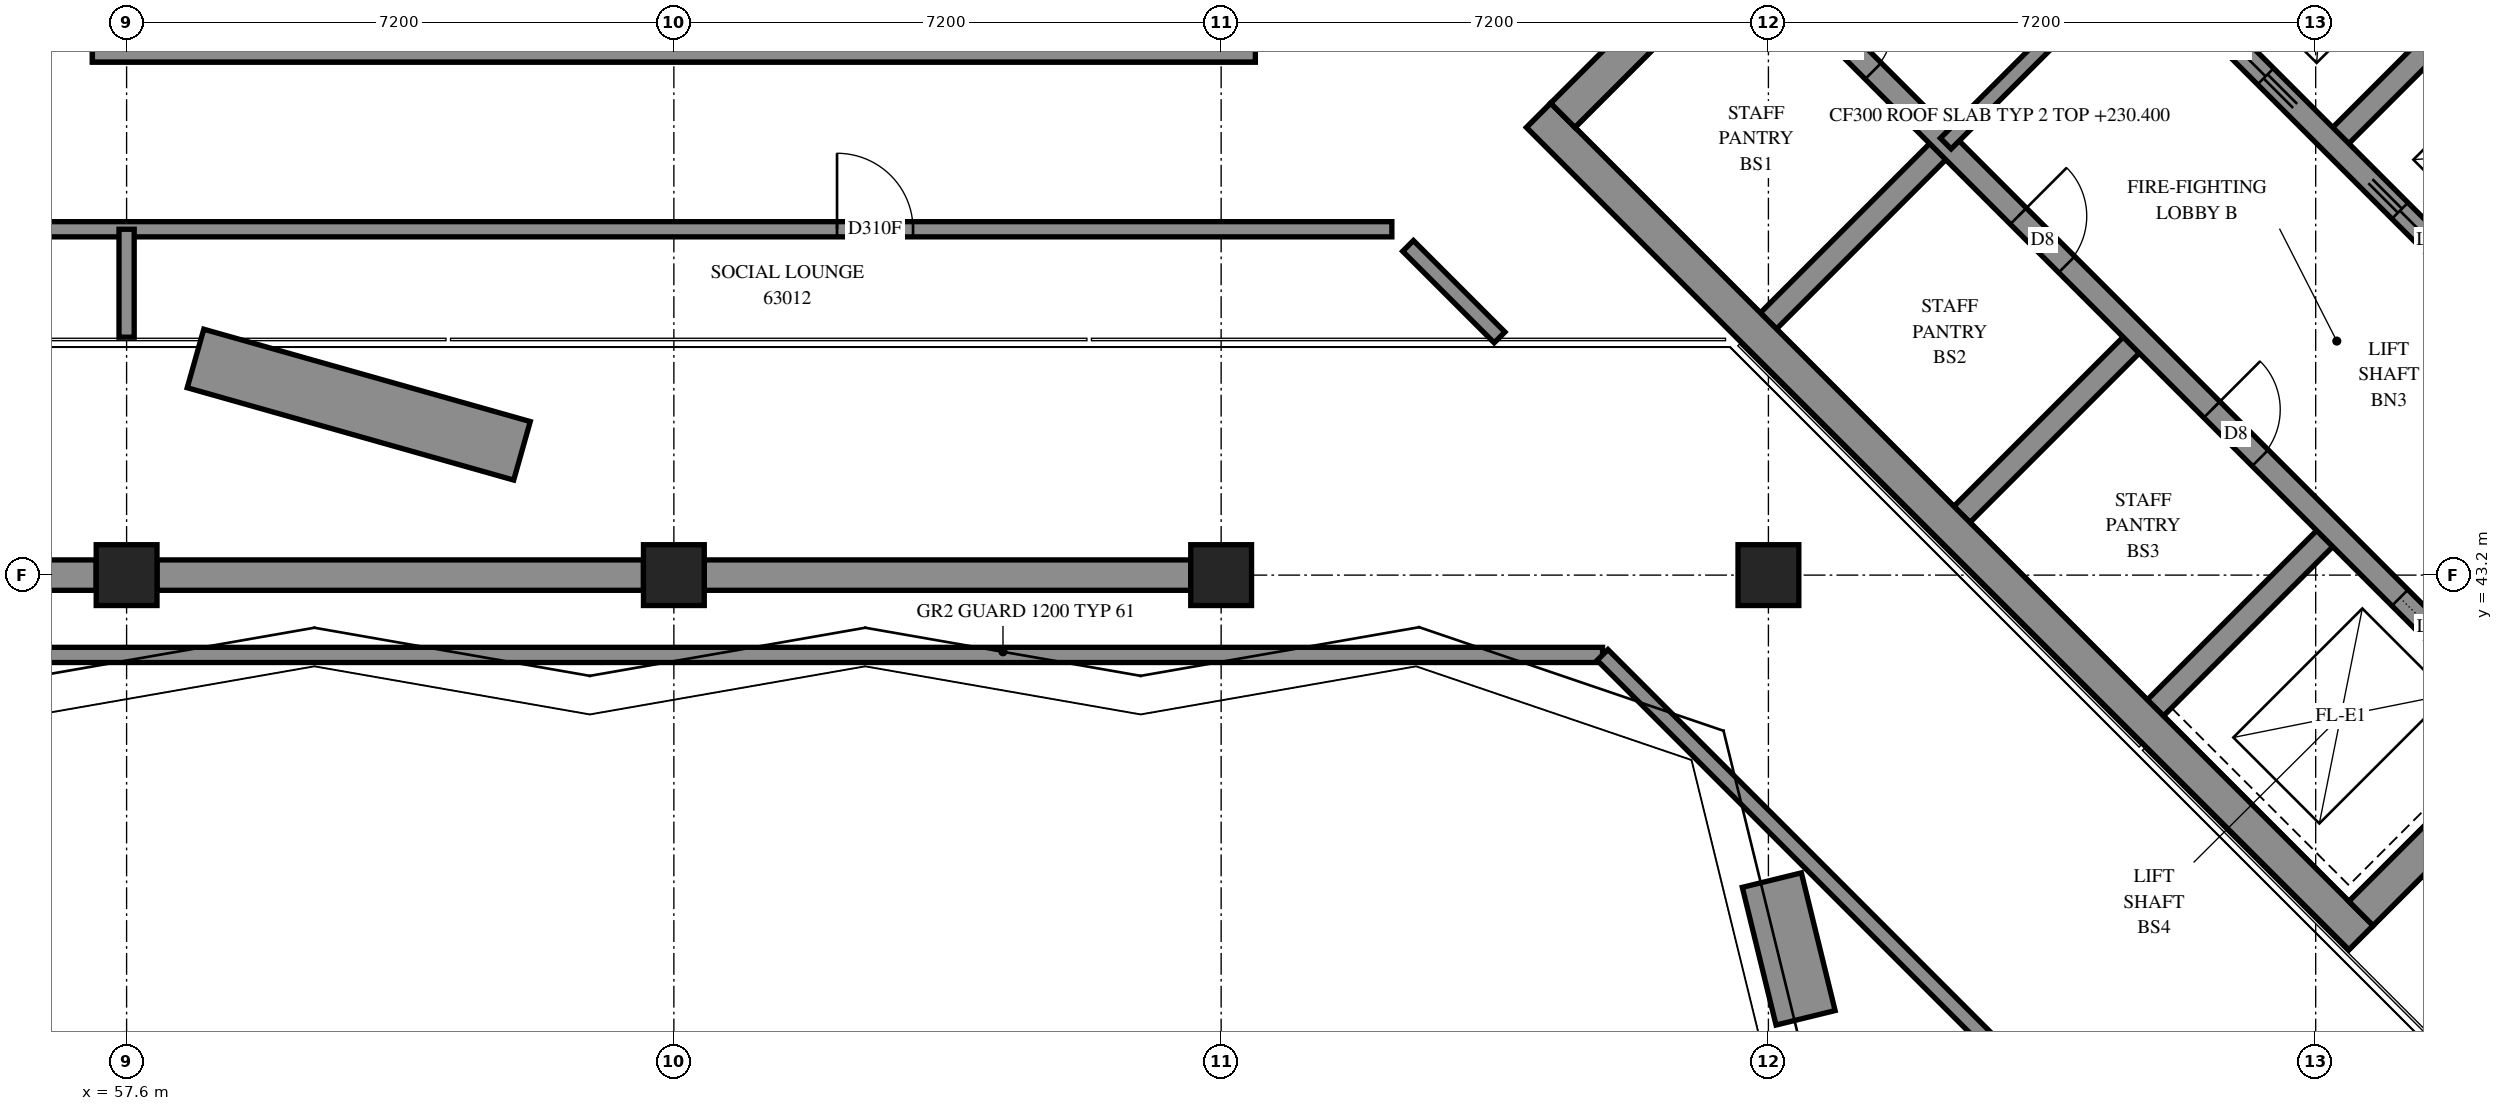
"""IFC4 building model, lengths in metres.
Left out: names, types, materials, properties, quantities, classifications, styles, units other than length and angle.
Written with IfcOpenShell. Run it as: python <this file> out.ifc"""

import sys

from ifc_helpers import new_model, si_unit, direction, frame, frame_2d, origin, origin_2d, place, context, subcontext, project, spatial, polyline, rectangle, outline, extrude, element, fill, save


model = new_model("IFC4")
c1 = context("Model", 3, precision=1e-05, world=origin(), true_north=direction((0.0, 1.0)))
c2 = subcontext(c1, "Body", "Model", "MODEL_VIEW")
j1 = project(units=[si_unit("LENGTHUNIT", "METRE"), si_unit("PLANEANGLEUNIT", "RADIAN")], contexts=[c1])
p1 = place(None, origin())
s1 = spatial("IfcSite", under=j1, at=p1, CompositionType="ELEMENT")
p2 = place(p1, origin())
s2 = spatial("IfcBuilding", under=s1, at=p2, CompositionType="ELEMENT")
p3 = place(p2, frame((0.0, 0.0, 230.4)))
s3 = spatial("IfcBuildingStorey", under=s2, at=p3, CompositionType="ELEMENT", Elevation=230.4)
for number, where, z_axis, x_axis in (
    (1, (57.6, 43.2, 0.0), (0.0, 0.0, 1.0), (1.0, 0.0, 0.0)),
    (2, (64.8, 43.2, 0.0), (0.0, 0.0, 1.0), (1.0, 0.0, 0.0)),
    (3, (72.0, 43.2, 0.0), (0.0, 0.0, 1.0), (1.0, 0.0, 0.0)),
    (4, (79.2, 43.2, 0.0), (0.0, 0.0, 1.0), (1.0, 0.0, 0.0)),
):
    element("IfcColumn", number, at=place(p3, frame(where, z_axis=z_axis, x_axis=x_axis)), inside=s3, PredefinedType="COLUMN", context=c2, shape_type="SweptSolid", body=[
        extrude(rectangle(XDim=0.8, YDim=0.8, at=origin_2d()), origin(), (0.0, 0.0, 1.0), 3.9),
    ])
for number, where, z_axis, x_axis in (
    (5, (57.15, 50.175, -0.3), (0.0, 0.0, 1.0), (1.0, 0.0, 0.0)),
    (6, (76.177, 49.249, -0.3), (0.0, 0.0, 1.0), (0.707, -0.707, 0.0)),
):
    element("IfcWall", number, at=place(p3, frame(where, z_axis=z_axis, x_axis=x_axis)), inside=s3, PredefinedType="SHEAR", context=c2, shape_type="SweptSolid", body=[
        extrude(rectangle(XDim=15.3, YDim=0.45, at=frame_2d((7.65, 0.0))), origin(), (0.0, 0.0, 1.0), 3.5),
    ])
p4 = place(p3, frame((86.678, 59.749, -0.3), z_axis=(0.0, 0.0, 1.0), x_axis=(0.7071035132, -0.7071100491, 0.0)))
e7 = element("IfcWall", 7, at=p4, inside=s3, PredefinedType="SHEAR", context=c2, shape_type="SweptSolid", body=[
    extrude(rectangle(XDim=15.3, YDim=0.45, at=frame_2d((7.65, 0.0))), origin(), (0.0, 0.0, 1.0), 3.5),
])
p5 = place(p4, frame((10.45, 0.0, 0.3)))
e8 = element("IfcOpeningElement", 8, at=p5, cuts=e7, PredefinedType="OPENING", context=c2, shape_type="SweptSolid", body=[
    extrude(rectangle(XDim=0.8, YDim=2.1, at=frame_2d((0.4, 1.05))), frame((0.0, 0.235, 0.0), z_axis=(0.0, -1.0, 0.0), x_axis=(1.0, 0.0, 0.0)), (0.0, 0.0, 1.0), 0.47),
])
p6 = place(p3, frame((76.495, 49.249, -0.3), z_axis=(0.0, 0.0, 1.0), x_axis=(0.7071067812, 0.7071067812, 0.0)))
e9 = element("IfcWall", 9, at=p6, inside=s3, PredefinedType="SHEAR", context=c2, shape_type="SweptSolid", body=[
    extrude(rectangle(XDim=14.4, YDim=0.45, at=frame_2d((7.2, 0.0))), origin(), (0.0, 0.0, 1.0), 3.5),
])
p7 = place(p6, frame((4.55, 0.0, 0.3)))
e10 = element("IfcOpeningElement", 10, at=p7, cuts=e9, PredefinedType="OPENING", context=c2, shape_type="SweptSolid", body=[
    extrude(rectangle(XDim=1.1, YDim=2.1, at=frame_2d((0.55, 1.05))), frame((0.0, 0.235, 0.0), z_axis=(0.0, -1.0, 0.0), x_axis=(1.0, 0.0, 0.0)), (0.0, 0.0, 1.0), 0.47),
])
p8 = place(p6, frame((11.35, 0.0, 0.3)))
e11 = element("IfcOpeningElement", 11, at=p8, cuts=e9, PredefinedType="OPENING", context=c2, shape_type="SweptSolid", body=[
    extrude(rectangle(XDim=1.1, YDim=2.1, at=frame_2d((0.55, 1.05))), frame((0.0, 0.235, 0.0), z_axis=(0.0, -1.0, 0.0), x_axis=(1.0, 0.0, 0.0)), (0.0, 0.0, 1.0), 0.47),
])
p9 = place(p3, frame((86.996, 38.748, -0.3), z_axis=(0.0, 0.0, 1.0), x_axis=(0.7071067812, 0.7071067812, 0.0)))
e12 = element("IfcWall", 12, at=p9, inside=s3, PredefinedType="SHEAR", context=c2, shape_type="SweptSolid", body=[
    extrude(rectangle(XDim=14.4, YDim=0.45, at=frame_2d((7.2, 0.0))), origin(), (0.0, 0.0, 1.0), 3.5),
])
p10 = place(p9, frame((4.55, 0.0, 0.3)))
e13 = element("IfcOpeningElement", 13, at=p10, cuts=e12, PredefinedType="OPENING", context=c2, shape_type="SweptSolid", body=[
    extrude(rectangle(XDim=1.1, YDim=2.1, at=frame_2d((0.55, 1.05))), frame((0.0, 0.235, 0.0), z_axis=(0.0, -1.0, 0.0), x_axis=(1.0, 0.0, 0.0)), (0.0, 0.0, 1.0), 0.47),
])
p11 = place(p9, frame((11.35, 0.0, 0.3)))
e14 = element("IfcOpeningElement", 14, at=p11, cuts=e12, PredefinedType="OPENING", context=c2, shape_type="SweptSolid", body=[
    extrude(rectangle(XDim=1.1, YDim=2.1, at=frame_2d((0.55, 1.05))), frame((0.0, 0.235, 0.0), z_axis=(0.0, -1.0, 0.0), x_axis=(1.0, 0.0, 0.0)), (0.0, 0.0, 1.0), 0.47),
])
p12 = place(p3, frame((79.2, 46.544, 0.0), z_axis=(0.0, 0.0, 1.0), x_axis=(0.7071219326, 0.7070916295, 0.0)))
e15 = element("IfcWall", 15, at=p12, inside=s3, PredefinedType="SOLIDWALL", context=c2, shape_type="SweptSolid", body=[
    extrude(rectangle(XDim=3.3, YDim=0.3, at=frame_2d((1.65, 0.0))), origin(), (0.0, 0.0, 1.0), 3.9),
])
p13 = place(p3, frame((81.746, 43.999, 0.0), z_axis=(0.0, 0.0, 1.0), x_axis=(0.7071067812, 0.7071067812, 0.0)))
e16 = element("IfcWall", 16, at=p13, inside=s3, PredefinedType="SOLIDWALL", context=c2, shape_type="SweptSolid", body=[
    extrude(rectangle(XDim=3.3, YDim=0.3, at=frame_2d((1.65, 0.0))), origin(), (0.0, 0.0, 1.0), 3.9),
])
p14 = place(p3, frame((86.625, 48.878, 0.0), z_axis=(0.0, 0.0, 1.0), x_axis=(0.7071067812, 0.7071067812, 0.0)))
e17 = element("IfcWall", 17, at=p14, inside=s3, PredefinedType="SOLIDWALL", context=c2, shape_type="SweptSolid", body=[
    extrude(rectangle(XDim=3.3, YDim=0.3, at=frame_2d((1.65, 0.0))), origin(), (0.0, 0.0, 1.0), 3.9),
])
p15 = place(p3, frame((84.291, 41.453, 0.0), z_axis=(0.0, 0.0, 1.0), x_axis=(0.7071067812, 0.7071067812, 0.0)))
e18 = element("IfcWall", 18, at=p15, inside=s3, PredefinedType="SOLIDWALL", context=c2, shape_type="SweptSolid", body=[
    extrude(rectangle(XDim=3.3, YDim=0.3, at=frame_2d((1.65, 0.0))), origin(), (0.0, 0.0, 1.0), 3.9),
])
p16 = place(p3, frame((78.988, 51.423, 0.0), z_axis=(0.0, 0.0, 1.0), x_axis=(0.7071067812, -0.7071067812, 0.0)))
e19 = element("IfcWall", 19, at=p16, inside=s3, PredefinedType="SOLIDWALL", context=c2, shape_type="SweptSolid", body=[
    extrude(rectangle(XDim=14.4, YDim=0.3, at=frame_2d((7.2, 0.0))), origin(), (0.0, 0.0, 1.0), 3.9),
])
p17 = place(p16, frame((1.35, 0.0, 0.0)))
e20 = element("IfcOpeningElement", 20, at=p17, cuts=e19, PredefinedType="OPENING", context=c2, shape_type="SweptSolid", body=[
    extrude(rectangle(XDim=0.9, YDim=2.1, at=frame_2d((0.45, 1.05))), frame((0.0, 0.16, 0.0), z_axis=(0.0, -1.0, 0.0), x_axis=(1.0, 0.0, 0.0)), (0.0, 0.0, 1.0), 0.32),
])
p18 = place(p16, frame((4.95, 0.0, 0.0)))
e21 = element("IfcOpeningElement", 21, at=p18, cuts=e19, PredefinedType="OPENING", context=c2, shape_type="SweptSolid", body=[
    extrude(rectangle(XDim=0.9, YDim=2.1, at=frame_2d((0.45, 1.05))), frame((0.0, 0.16, 0.0), z_axis=(0.0, -1.0, 0.0), x_axis=(1.0, 0.0, 0.0)), (0.0, 0.0, 1.0), 0.32),
])
p19 = place(p16, frame((8.55, 0.0, 0.0)))
e22 = element("IfcOpeningElement", 22, at=p19, cuts=e19, PredefinedType="OPENING", context=c2, shape_type="SweptSolid", body=[
    extrude(rectangle(XDim=0.9, YDim=2.1, at=frame_2d((0.45, 1.05))), frame((0.0, 0.16, 0.0), z_axis=(0.0, -1.0, 0.0), x_axis=(1.0, 0.0, 0.0)), (0.0, 0.0, 1.0), 0.32),
])
p20 = place(p16, frame((12.05, 0.0, 0.0)))
e23 = element("IfcOpeningElement", 23, at=p20, cuts=e19, PredefinedType="OPENING", context=c2, shape_type="SweptSolid", body=[
    extrude(rectangle(XDim=1.1, YDim=2.1, at=frame_2d((0.55, 1.05))), frame((0.0, 0.16, 0.0), z_axis=(0.0, -1.0, 0.0), x_axis=(1.0, 0.0, 0.0)), (0.0, 0.0, 1.0), 0.32),
])
p21 = place(p3, frame((81.534, 53.969, 0.0), z_axis=(0.0, 0.0, 1.0), x_axis=(0.707103309, -0.7071102534, 0.0)))
e24 = element("IfcWall", 24, at=p21, inside=s3, PredefinedType="SOLIDWALL", context=c2, shape_type="SweptSolid", body=[
    extrude(rectangle(XDim=14.4, YDim=0.3, at=frame_2d((7.2, 0.0))), origin(), (0.0, 0.0, 1.0), 3.9),
])
p22 = place(p21, frame((1.25, 0.0, 0.0)))
e25 = element("IfcOpeningElement", 25, at=p22, cuts=e24, PredefinedType="OPENING", context=c2, shape_type="SweptSolid", body=[
    extrude(rectangle(XDim=1.1, YDim=2.1, at=frame_2d((0.55, 1.05))), frame((0.0, 0.16, 0.0), z_axis=(0.0, -1.0, 0.0), x_axis=(1.0, 0.0, 0.0)), (0.0, 0.0, 1.0), 0.32),
])
p23 = place(p21, frame((4.85, 0.0, 0.0)))
e26 = element("IfcOpeningElement", 26, at=p23, cuts=e24, PredefinedType="OPENING", context=c2, shape_type="SweptSolid", body=[
    extrude(rectangle(XDim=1.1, YDim=2.1, at=frame_2d((0.55, 1.05))), frame((0.0, 0.16, 0.0), z_axis=(0.0, -1.0, 0.0), x_axis=(1.0, 0.0, 0.0)), (0.0, 0.0, 1.0), 0.32),
])
p24 = place(p21, frame((8.45, 0.0, 0.0)))
e27 = element("IfcOpeningElement", 27, at=p24, cuts=e24, PredefinedType="OPENING", context=c2, shape_type="SweptSolid", body=[
    extrude(rectangle(XDim=1.1, YDim=2.1, at=frame_2d((0.55, 1.05))), frame((0.0, 0.16, 0.0), z_axis=(0.0, -1.0, 0.0), x_axis=(1.0, 0.0, 0.0)), (0.0, 0.0, 1.0), 0.32),
])
p25 = place(p21, frame((12.05, 0.0, 0.0)))
e28 = element("IfcOpeningElement", 28, at=p25, cuts=e24, PredefinedType="OPENING", context=c2, shape_type="SweptSolid", body=[
    extrude(rectangle(XDim=1.1, YDim=2.1, at=frame_2d((0.55, 1.05))), frame((0.0, 0.16, 0.0), z_axis=(0.0, -1.0, 0.0), x_axis=(1.0, 0.0, 0.0)), (0.0, 0.0, 1.0), 0.32),
])
p26 = place(p3, frame((79.245, 39.188, 0.0), z_axis=(0.0, 0.0, 1.0), x_axis=(0.2379162082, -0.9712856829, 0.0)))
e29 = element("IfcWall", 29, at=p26, inside=s3, PredefinedType="SOLIDWALL", context=c2, shape_type="SweptSolid", body=[
    extrude(rectangle(XDim=1.865, YDim=0.8, at=frame_2d((0.933, 0.0))), origin(), (0.0, 0.0, 1.0), 0.65),
])
p27 = place(p3, frame((62.802, 44.835, 0.0), z_axis=(0.0, 0.0, 1.0), x_axis=(-0.962266055, 0.2721103442, 0.0)))
e30 = element("IfcWall", 30, at=p27, inside=s3, PredefinedType="SOLIDWALL", context=c2, shape_type="SweptSolid", body=[
    extrude(rectangle(XDim=4.464, YDim=0.8, at=frame_2d((2.232, 0.0))), origin(), (0.0, 0.0, 1.0), 0.65),
])
p28 = place(p3, frame((102.747, 49.938, 0.0), z_axis=(0.0, 0.0, 1.0), x_axis=(-0.7071083109, 0.7071052514, 0.0)))
e31 = element("IfcWall", 31, at=p28, inside=s3, PredefinedType="SOLIDWALL", context=c2, shape_type="SweptSolid", body=[
    extrude(outline(polyline([(-0.1, -0.1), (32.726, -0.1), (32.644, 0.1), (0.1, 0.1), (-0.1, -0.1)])), origin(), (0.0, 0.0, 1.0), 4.2),
])
p29 = place(p3, frame((49.35, 42.15, 0.0), z_axis=(0.0, 0.0, 1.0), x_axis=(1.0, 0.0, 0.0)))
e32 = element("IfcWall", 32, at=p29, inside=s3, PredefinedType="SOLIDWALL", context=c2, shape_type="SweptSolid", body=[
    extrude(outline(polyline([(-0.1, -0.1), (27.627, -0.1), (27.709, 0.1), (0.1, 0.1), (-0.1, -0.1)])), origin(), (0.0, 0.0, 1.0), 4.2),
])
p30 = place(p3, frame((77.018, 42.15, 0.0), z_axis=(0.0, 0.0, 1.0), x_axis=(0.7071039217, -0.7071096407, 0.0)))
e33 = element("IfcWall", 33, at=p30, inside=s3, PredefinedType="SOLIDWALL", context=c2, shape_type="SweptSolid", body=[
    extrude(outline(polyline([(0.041, -0.1), (17.586, -0.1), (17.386, 0.1), (-0.041, 0.1), (0.041, -0.1)])), origin(), (0.0, 0.0, 1.0), 4.2),
])
p31 = place(p3, frame((81.534, 48.878, 0.0), z_axis=(0.0, 0.0, 1.0), x_axis=(0.707092892, 0.7071206701, 0.0)))
e34 = element("IfcWall", 34, at=p31, inside=s3, PredefinedType="PARTITIONING", context=c2, shape_type="SweptSolid", body=[
    extrude(rectangle(XDim=3.6, YDim=0.2, at=frame_2d((1.8, 0.0))), origin(), (0.0, 0.0, 1.0), 3.9),
])
p32 = place(p3, frame((54.95, 47.75, 0.0), z_axis=(0.0, 0.0, 1.0), x_axis=(1.0, 0.0, 0.0)))
e35 = element("IfcWall", 35, at=p32, inside=s3, PredefinedType="PARTITIONING", context=c2, shape_type="SweptSolid", body=[
    extrude(rectangle(XDim=19.296, YDim=0.2, at=frame_2d((9.648, 0.0))), origin(), (0.0, 0.0, 1.0), 3.9),
])
p33 = place(p32, frame((11.997, 0.0, 0.0)))
e36 = element("IfcOpeningElement", 36, at=p33, cuts=e35, PredefinedType="OPENING", context=c2, shape_type="SweptSolid", body=[
    extrude(rectangle(XDim=1.0, YDim=2.1, at=frame_2d((0.5, 1.05))), frame((0.0, 0.11, 0.0), z_axis=(0.0, -1.0, 0.0), x_axis=(1.0, 0.0, 0.0)), (0.0, 0.0, 1.0), 0.22),
])
p34 = place(p3, frame((74.459, 47.531, 0.0), z_axis=(0.0, 0.0, 1.0), x_axis=(0.7071067812, -0.7071067812, 0.0)))
e37 = element("IfcWall", 37, at=p34, inside=s3, PredefinedType="PARTITIONING", context=c2, shape_type="SweptSolid", body=[
    extrude(rectangle(XDim=1.703, YDim=0.2, at=frame_2d((0.851, 0.0))), origin(), (0.0, 0.0, 1.0), 3.9),
])
p35 = place(p3, frame((57.6, 46.33, 0.0), z_axis=(0.0, 0.0, 1.0), x_axis=(0.0, 1.0, 0.0)))
e38 = element("IfcWall", 38, at=p35, inside=s3, PredefinedType="PARTITIONING", context=c2, shape_type="SweptSolid", body=[
    extrude(rectangle(XDim=1.42, YDim=0.2, at=frame_2d((0.71, 0.0))), origin(), (0.0, 0.0, 1.0), 3.9),
])
p36 = place(p17, origin())
e39 = element("IfcDoor", 39, at=p36, inside=s3, OperationType="SINGLE_SWING_LEFT", PredefinedType="DOOR", context=c2, shape_type="SweptSolid", body=[
    extrude(rectangle(XDim=0.9, YDim=2.1, at=frame_2d((0.45, 1.05))), frame((0.0, 0.025, 0.0), z_axis=(0.0, -1.0, 0.0), x_axis=(1.0, 0.0, 0.0)), (0.0, 0.0, 1.0), 0.05),
])
fill(e20, e39)
p37 = place(p18, origin())
e40 = element("IfcDoor", 40, at=p37, inside=s3, OperationType="SINGLE_SWING_LEFT", PredefinedType="DOOR", context=c2, shape_type="SweptSolid", body=[
    extrude(rectangle(XDim=0.9, YDim=2.1, at=frame_2d((0.45, 1.05))), frame((0.0, 0.025, 0.0), z_axis=(0.0, -1.0, 0.0), x_axis=(1.0, 0.0, 0.0)), (0.0, 0.0, 1.0), 0.05),
])
fill(e21, e40)
p38 = place(p19, origin())
e41 = element("IfcDoor", 41, at=p38, inside=s3, OperationType="SINGLE_SWING_LEFT", PredefinedType="DOOR", context=c2, shape_type="SweptSolid", body=[
    extrude(rectangle(XDim=0.9, YDim=2.1, at=frame_2d((0.45, 1.05))), frame((0.0, 0.025, 0.0), z_axis=(0.0, -1.0, 0.0), x_axis=(1.0, 0.0, 0.0)), (0.0, 0.0, 1.0), 0.05),
])
fill(e22, e41)
p39 = place(p20, origin())
e42 = element("IfcDoor", 42, at=p39, inside=s3, OperationType="SLIDING_TO_RIGHT", PredefinedType="DOOR", context=c2, shape_type="SweptSolid", body=[
    extrude(rectangle(XDim=1.1, YDim=2.1, at=frame_2d((0.55, 1.05))), frame((0.0, 0.025, 0.0), z_axis=(0.0, -1.0, 0.0), x_axis=(1.0, 0.0, 0.0)), (0.0, 0.0, 1.0), 0.05),
])
fill(e23, e42)
p40 = place(p23, origin())
e43 = element("IfcDoor", 43, at=p40, inside=s3, OperationType="SLIDING_TO_RIGHT", PredefinedType="DOOR", context=c2, shape_type="SweptSolid", body=[
    extrude(rectangle(XDim=1.1, YDim=2.1, at=frame_2d((0.55, 1.05))), frame((0.0, 0.025, 0.0), z_axis=(0.0, -1.0, 0.0), x_axis=(1.0, 0.0, 0.0)), (0.0, 0.0, 1.0), 0.05),
])
fill(e26, e43)
p41 = place(p24, origin())
e44 = element("IfcDoor", 44, at=p41, inside=s3, OperationType="SLIDING_TO_LEFT", PredefinedType="DOOR", context=c2, shape_type="SweptSolid", body=[
    extrude(rectangle(XDim=1.1, YDim=2.1, at=frame_2d((0.55, 1.05))), frame((0.0, 0.025, 0.0), z_axis=(0.0, -1.0, 0.0), x_axis=(1.0, 0.0, 0.0)), (0.0, 0.0, 1.0), 0.05),
])
fill(e27, e44)
p42 = place(p33, origin())
e45 = element("IfcDoor", 45, at=p42, inside=s3, OperationType="SINGLE_SWING_LEFT", PredefinedType="DOOR", context=c2, shape_type="SweptSolid", body=[
    extrude(rectangle(XDim=1.0, YDim=2.1, at=frame_2d((0.5, 1.05))), frame((0.0, 0.025, 0.0), z_axis=(0.0, -1.0, 0.0), x_axis=(1.0, 0.0, 0.0)), (0.0, 0.0, 1.0), 0.05),
])
fill(e36, e45)
save(model, sys.argv[1])
